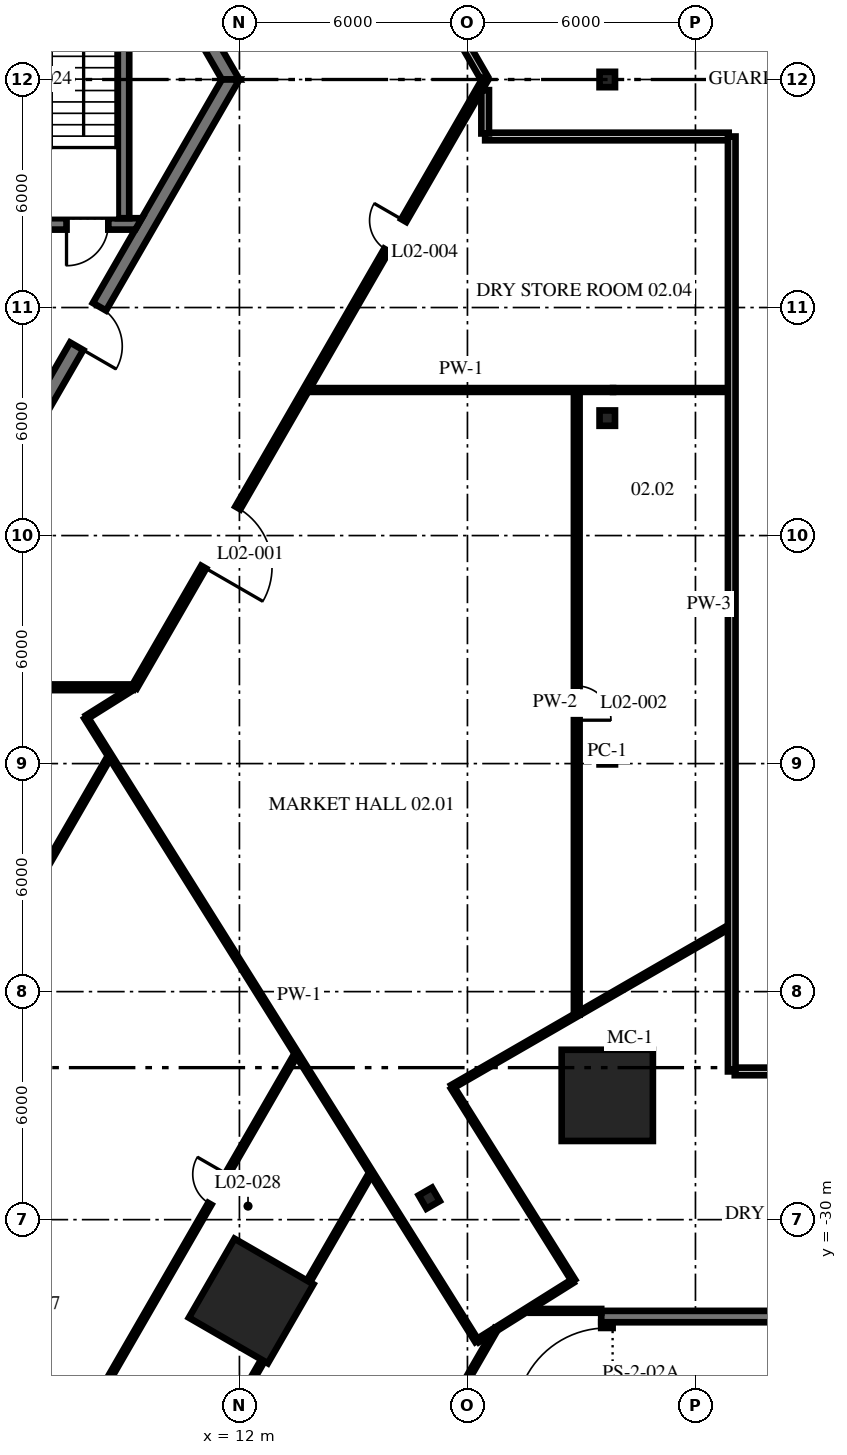
"""IFC4 building model, lengths in metres.
Left out: names, types, materials, properties, quantities, classifications, styles, units other than length and angle.
Written with IfcOpenShell. Run it as: python <this file> out.ifc"""

import sys

from ifc_helpers import new_model, si_unit, direction, frame, frame_2d, origin, origin_2d, place, context, subcontext, project, spatial, polyline, rectangle, i_section, outline, extrude, source, transform, mapped, element, fill, save


model = new_model("IFC4")
c1 = context("Model", 3, precision=1e-05, world=origin(), true_north=direction((0.0, 1.0)))
c2 = subcontext(c1, "Body", "Model", "MODEL_VIEW")
j1 = project(units=[si_unit("LENGTHUNIT", "METRE"), si_unit("PLANEANGLEUNIT", "RADIAN")], contexts=[c1])
p1 = place(None, origin())
s1 = spatial("IfcSite", under=j1, at=p1, CompositionType="ELEMENT")
p2 = place(p1, origin())
s2 = spatial("IfcBuilding", under=s1, at=p2, CompositionType="ELEMENT")
p3 = place(p2, frame((0.0, 0.0, 11.5)))
s3 = spatial("IfcBuildingStorey", under=s2, at=p3, CompositionType="ELEMENT", Elevation=11.5)
m1 = source(origin(), c2, "Body", "SweptSolid", [
    extrude(rectangle(XDim=2.4, YDim=2.4, at=origin_2d()), origin(), (0.0, 0.0, 1.0), 4.5),
])
p4 = place(p3, frame((21.679, -26.73, 0.0), z_axis=(0.0, 0.0, 1.0), x_axis=(0.0, 1.0, 0.0)))
e1 = element("IfcColumn", 1, at=p4, inside=s3, PredefinedType="COLUMN", context=c2, shape_type="MappedRepresentation", body=[
    mapped(m1, transform((0.0, 0.0, 0.0), scale=1.0)),
])
m2 = source(origin(), c2, "Body", "SweptSolid", [
    extrude(i_section(OverallWidth=0.404, OverallDepth=0.406, WebThickness=0.027, FlangeThickness=0.044, at=origin_2d()), origin(), (0.0, 0.0, 1.0), 4.5),
])
for number, where, z_axis, x_axis in (
    (2, (21.679, -17.82, 0.0), (0.0, 0.0, 1.0), (0.0, 1.0, 0.0)),
    (3, (21.679, -8.91, 0.0), (0.0, 0.0, 1.0), (0.0, 1.0, 0.0)),
    (4, (21.679, 0.0, 0.0), (0.0, 0.0, 1.0), (0.0, 1.0, 0.0)),
):
    element("IfcColumn", number, at=place(p3, frame(where, z_axis=z_axis, x_axis=x_axis)), inside=s3, PredefinedType="COLUMN", context=c2, shape_type="MappedRepresentation", body=[
        mapped(m2, transform((0.0, 0.0, 0.0), scale=1.0)),
    ])
p5 = place(p3, frame((12.309, -32.14, 0.0), z_axis=(0.0, 0.0, 1.0), x_axis=(0.866025403784, -0.5, 0.0)))
e5 = element("IfcColumn", 5, at=p5, inside=s3, PredefinedType="COLUMN", context=c2, shape_type="MappedRepresentation", body=[
    mapped(m1, transform((0.0, 0.0, 0.0), scale=1.0)),
])
p6 = place(p3, frame((16.994, -29.435, 0.0), z_axis=(0.0, 0.0, 1.0), x_axis=(0.866026276448, 0.4999984885, 0.0)))
e6 = element("IfcColumn", 6, at=p6, inside=s3, PredefinedType="COLUMN", context=c2, shape_type="MappedRepresentation", body=[
    mapped(m2, transform((0.0, 0.0, 0.0), scale=1.0)),
])
m3 = source(origin(), c2, "Body", "SweptSolid", [
    extrude(outline(polyline([(-0.115, -0.2), (11.885, -0.2), (11.654, 0.2), (0.115, 0.2), (-0.115, -0.2)])), origin(), (0.0, 0.0, 1.0), 4.3),
])
p7 = place(p3, frame((11.769, 0.0, 0.0), z_axis=(0.0, 0.0, 1.0), x_axis=(-0.499996592174, 0.866027371285, 0.0)))
e7 = element("IfcWall", 7, at=p7, inside=s3, PredefinedType="SHEAR", context=c2, shape_type="MappedRepresentation", body=[
    mapped(m3, transform((0.0, 0.0, 0.0), scale=1.0)),
])
p8 = place(p7, frame((5.75, 0.0, 0.0)))
e8 = element("IfcOpeningElement", 8, at=p8, cuts=e7, PredefinedType="OPENING", context=c2, shape_type="SweptSolid", body=[
    extrude(rectangle(XDim=1.2, YDim=2.1, at=frame_2d((0.6, 1.05))), frame((0.0, 0.21, 0.0), z_axis=(0.0, -1.0, 0.0), x_axis=(1.0, 0.0, 0.0)), (0.0, 0.0, 1.0), 0.42),
])
p9 = place(p3, frame((5.885, -10.192, 0.0), z_axis=(0.0, 0.0, 1.0), x_axis=(0.499996592174, 0.866027371285, 0.0)))
e9 = element("IfcWall", 9, at=p9, inside=s3, PredefinedType="SHEAR", context=c2, shape_type="MappedRepresentation", body=[
    mapped(m3, transform((0.0, 0.0, 0.0), scale=1.0)),
])
p10 = place(p9, frame((3.665, 0.0, 0.0)))
e10 = element("IfcOpeningElement", 10, at=p10, cuts=e9, PredefinedType="OPENING", context=c2, shape_type="SweptSolid", body=[
    extrude(rectangle(XDim=1.2, YDim=2.1, at=frame_2d((0.6, 1.05))), frame((0.0, 0.21, 0.0), z_axis=(0.0, -1.0, 0.0), x_axis=(1.0, 0.0, 0.0)), (0.0, 0.0, 1.0), 0.42),
])
m4 = source(origin(), c2, "Body", "SweptSolid", [
    extrude(outline(polyline([(0.0, -0.15), (0.0, 0.15), (4.433, 0.15), (4.26, -0.15), (0.0, -0.15)])), origin(), (0.0, 0.0, 1.0), 4.3),
])
p11 = place(p3, frame((5.0, -3.8, 0.0), z_axis=(0.0, 0.0, 1.0), x_axis=(1.0, 0.0, 0.0)))
e11 = element("IfcWall", 11, at=p11, inside=s3, PredefinedType="SHEAR", context=c2, shape_type="MappedRepresentation", body=[
    mapped(m4, transform((0.0, 0.0, 0.0), scale=1.0)),
])
p12 = place(p11, frame((2.45, 0.0, 0.0)))
e12 = element("IfcOpeningElement", 12, at=p12, cuts=e11, PredefinedType="OPENING", context=c2, shape_type="SweptSolid", body=[
    extrude(rectangle(XDim=1.1, YDim=2.1, at=frame_2d((0.55, 1.05))), frame((0.0, 0.16, 0.0), z_axis=(0.0, -1.0, 0.0), x_axis=(1.0, 0.0, 0.0)), (0.0, 0.0, 1.0), 0.32),
])
m5 = source(origin(), c2, "Body", "SweptSolid", [
    extrude(rectangle(XDim=7.3, YDim=0.3, at=frame_2d((3.65, 0.0))), origin(), (0.0, 0.0, 1.0), 4.3),
])
p13 = place(p3, frame((8.95, -3.65, 0.0), z_axis=(0.0, 0.0, 1.0), x_axis=(0.0, 1.0, 0.0)))
e13 = element("IfcWall", 13, at=p13, inside=s3, PredefinedType="SHEAR", context=c2, shape_type="MappedRepresentation", body=[
    mapped(m5, transform((0.0, 0.0, 0.0), scale=1.0)),
])
m6 = source(origin(), c2, "Body", "SweptSolid", [
    extrude(rectangle(XDim=10.3, YDim=0.3, at=frame_2d((5.15, 0.0))), origin(), (0.0, 0.0, 1.0), 4.3),
])
p14 = place(p3, frame((21.67, -43.0, 0.0), z_axis=(0.0, 0.0, 1.0), x_axis=(0.0, 1.0, 0.0)))
e14 = element("IfcWall", 14, at=p14, inside=s3, PredefinedType="SHEAR", context=c2, shape_type="MappedRepresentation", body=[
    mapped(m6, transform((0.0, 0.0, 0.0), scale=1.0)),
])
p15 = place(p14, frame((7.75, 0.0, 0.0)))
e15 = element("IfcOpeningElement", 15, at=p15, cuts=e14, PredefinedType="OPENING", context=c2, shape_type="SweptSolid", body=[
    extrude(rectangle(XDim=2.4, YDim=2.1, at=frame_2d((1.2, 1.05))), frame((0.0, 0.16, 0.0), z_axis=(0.0, -1.0, 0.0), x_axis=(1.0, 0.0, 0.0)), (0.0, 0.0, 1.0), 0.32),
])
m7 = source(origin(), c2, "Body", "SweptSolid", [
    extrude(rectangle(XDim=6.26, YDim=0.3, at=frame_2d((3.13, 0.0))), origin(), (0.0, 0.0, 1.0), 4.3),
])
p16 = place(p3, frame((21.52, -32.55, 0.0), z_axis=(0.0, 0.0, 1.0), x_axis=(1.0, 0.0, 0.0)))
e16 = element("IfcWall", 16, at=p16, inside=s3, PredefinedType="SHEAR", context=c2, shape_type="MappedRepresentation", body=[
    mapped(m7, transform((0.0, 0.0, 0.0), scale=1.0)),
])
p17 = place(p3, frame((9.254, 15.956, 0.0), z_axis=(0.0, 0.0, 1.0), x_axis=(0.499997220877, -0.866027008306, 0.0)))
e17 = element("IfcWall", 17, at=p17, inside=s3, PredefinedType="PARTITIONING", context=c2, shape_type="SweptSolid", body=[
    extrude(rectangle(XDim=18.382, YDim=0.2, at=frame_2d((9.191, 0.0))), origin(), (0.0, 0.0, 1.0), 4.3),
])
p18 = place(p17, frame((13.274, 0.0, 0.0)))
e18 = element("IfcOpeningElement", 18, at=p18, cuts=e17, PredefinedType="OPENING", context=c2, shape_type="SweptSolid", body=[
    extrude(rectangle(XDim=0.9, YDim=2.1, at=frame_2d((0.45, 1.05))), frame((0.0, 0.11, 0.0), z_axis=(0.0, -1.0, 0.0), x_axis=(1.0, 0.0, 0.0)), (0.0, 0.0, 1.0), 0.22),
])
p19 = place(p3, frame((7.962, -16.789, 0.0), z_axis=(0.0, 0.0, 1.0), x_axis=(0.531179225495, -0.847259482333, 0.0)))
e19 = element("IfcWall", 19, at=p19, inside=s3, PredefinedType="PARTITIONING", context=c2, shape_type="SweptSolid", body=[
    extrude(rectangle(XDim=19.366, YDim=0.1, at=frame_2d((9.683, 0.0))), origin(), (0.0, 0.0, 1.0), 4.3),
])
p20 = place(p3, frame((17.61, -26.529, 0.0), z_axis=(0.0, 0.0, 1.0), x_axis=(0.531181923243, -0.847257791006, 0.0)))
e20 = element("IfcWall", 20, at=p20, inside=s3, PredefinedType="PARTITIONING", context=c2, shape_type="SweptSolid", body=[
    extrude(rectangle(XDim=5.989, YDim=0.1, at=frame_2d((2.995, 0.0))), origin(), (0.0, 0.0, 1.0), 4.3),
])
p21 = place(p3, frame((19.66, -32.4, 0.0), z_axis=(0.0, 0.0, 1.0), x_axis=(1.0, 0.0, 0.0)))
e21 = element("IfcWall", 21, at=p21, inside=s3, PredefinedType="PARTITIONING", context=c2, shape_type="SweptSolid", body=[
    extrude(rectangle(XDim=1.86, YDim=0.1, at=frame_2d((0.93, 0.0))), origin(), (0.0, 0.0, 1.0), 4.3),
])
p22 = place(p3, frame((25.034, -26.1, 0.0), z_axis=(0.0, 0.0, 1.0), x_axis=(1.0, 0.0, 0.0)))
e22 = element("IfcWall", 22, at=p22, inside=s3, PredefinedType="PARTITIONING", context=c2, shape_type="SweptSolid", body=[
    extrude(rectangle(XDim=6.345, YDim=0.2, at=frame_2d((3.173, 0.0))), origin(), (0.0, 0.0, 1.0), 4.3),
])
p23 = place(p22, frame((2.67, 0.0, 0.0)))
e23 = element("IfcOpeningElement", 23, at=p23, cuts=e22, PredefinedType="OPENING", context=c2, shape_type="SweptSolid", body=[
    extrude(rectangle(XDim=0.9, YDim=2.1, at=frame_2d((0.45, 1.05))), frame((0.0, 0.11, 0.0), z_axis=(0.0, -1.0, 0.0), x_axis=(1.0, 0.0, 0.0)), (0.0, 0.0, 1.0), 0.22),
])
p24 = place(p3, frame((-9.193, -15.992, 0.0), z_axis=(0.0, 0.0, 1.0), x_axis=(1.0, 0.0, 0.0)))
e24 = element("IfcWall", 24, at=p24, inside=s3, PredefinedType="PARTITIONING", context=c2, shape_type="SweptSolid", body=[
    extrude(rectangle(XDim=18.385, YDim=0.15, at=frame_2d((9.192, 0.0))), origin(), (0.0, 0.0, 1.0), 4.3),
])
p25 = place(p24, frame((4.21, 0.0, 0.0)))
e25 = element("IfcOpeningElement", 25, at=p25, cuts=e24, PredefinedType="OPENING", context=c2, shape_type="SweptSolid", body=[
    extrude(rectangle(XDim=0.9, YDim=2.1, at=frame_2d((0.45, 1.05))), frame((0.0, 0.085, 0.0), z_axis=(0.0, -1.0, 0.0), x_axis=(1.0, 0.0, 0.0)), (0.0, 0.0, 1.0), 0.17),
])
p26 = place(p24, frame((13.444, 0.0, 0.0)))
e26 = element("IfcOpeningElement", 26, at=p26, cuts=e24, PredefinedType="OPENING", context=c2, shape_type="SweptSolid", body=[
    extrude(rectangle(XDim=0.9, YDim=2.1, at=frame_2d((0.45, 1.05))), frame((0.0, 0.085, 0.0), z_axis=(0.0, -1.0, 0.0), x_axis=(1.0, 0.0, 0.0)), (0.0, 0.0, 1.0), 0.17),
])
m8 = source(origin(), c2, "Body", "SweptSolid", [
    extrude(rectangle(XDim=7.992, YDim=0.1, at=frame_2d((3.996, 0.0))), origin(), (0.0, 0.0, 1.0), 4.3),
])
p27 = place(p3, frame((13.839, -8.17, 0.0), z_axis=(0.0, 0.0, 1.0), x_axis=(1.0, 0.0, 0.0)))
e27 = element("IfcWall", 27, at=p27, inside=s3, PredefinedType="PARTITIONING", context=c2, shape_type="MappedRepresentation", body=[
    mapped(m8, transform((0.0, 0.0, 0.0), scale=1.0)),
])
p28 = place(p3, frame((21.832, -8.17, 0.0), z_axis=(0.0, 0.0, 1.0), x_axis=(1.0, 0.0, 0.0)))
e28 = element("IfcWall", 28, at=p28, inside=s3, PredefinedType="PARTITIONING", context=c2, shape_type="SweptSolid", body=[
    extrude(rectangle(XDim=3.042, YDim=0.1, at=frame_2d((1.521, 0.0))), origin(), (0.0, 0.0, 1.0), 3.528),
])
p29 = place(p3, frame((18.466, -1.5, 0.0), z_axis=(0.0, 0.0, 1.0), x_axis=(1.0, 0.0, 0.0)))
e29 = element("IfcWall", 29, at=p29, inside=s3, PredefinedType="PARTITIONING", context=c2, shape_type="SweptSolid", body=[
    extrude(rectangle(XDim=6.408, YDim=0.2, at=frame_2d((3.204, 0.0))), origin(), (0.0, 0.0, 1.0), 4.3),
])
p30 = place(p3, frame((17.594, -26.503, 0.0), z_axis=(0.0, 0.0, 1.0), x_axis=(0.86602013072, 0.500009133105, 0.0)))
e30 = element("IfcWall", 30, at=p30, inside=s3, PredefinedType="PARTITIONING", context=c2, shape_type="SweptSolid", body=[
    extrude(rectangle(XDim=8.379, YDim=0.1, at=frame_2d((4.189, 0.0))), origin(), (0.0, 0.0, 1.0), 4.3),
])
p31 = place(p3, frame((18.272, -33.182, 0.0), z_axis=(0.0, 0.0, 1.0), x_axis=(0.847486689637, 0.530816645263, 0.0)))
e31 = element("IfcWall", 31, at=p31, inside=s3, PredefinedType="PARTITIONING", context=c2, shape_type="SweptSolid", body=[
    extrude(rectangle(XDim=0.402, YDim=0.1, at=frame_2d((0.201, 0.0))), origin(), (0.0, 0.0, 1.0), 4.3),
])
p32 = place(p3, frame((18.751, -32.882, 0.0), z_axis=(0.0, 0.0, 1.0), x_axis=(0.847201589507, 0.531271556492, 0.0)))
e32 = element("IfcWall", 32, at=p32, inside=s3, PredefinedType="PARTITIONING", context=c2, shape_type="SweptSolid", body=[
    extrude(rectangle(XDim=2.379, YDim=0.1, at=frame_2d((1.189, 0.0))), origin(), (0.0, 0.0, 1.0), 4.3),
])
p33 = place(p3, frame((7.988, -16.773, 0.0), z_axis=(0.0, 0.0, 1.0), x_axis=(0.84724259676, 0.531206157942, 0.0)))
e33 = element("IfcWall", 33, at=p33, inside=s3, PredefinedType="PARTITIONING", context=c2, shape_type="SweptSolid", body=[
    extrude(rectangle(XDim=1.29, YDim=0.1, at=frame_2d((0.645, 0.0))), origin(), (0.0, 0.0, 1.0), 4.3),
])
p34 = place(p3, frame((12.612, -43.515, 0.0), z_axis=(0.0, 0.0, 1.0), x_axis=(0.500009898248, 0.866019688953, 0.0)))
e34 = element("IfcWall", 34, at=p34, inside=s3, PredefinedType="PARTITIONING", context=c2, shape_type="SweptSolid", body=[
    extrude(rectangle(XDim=12.278, YDim=0.1, at=frame_2d((6.139, 0.0))), origin(), (0.0, 0.0, 1.0), 4.3),
])
p35 = place(p34, frame((5.675, 0.0, 0.0)))
e35 = element("IfcOpeningElement", 35, at=p35, cuts=e34, PredefinedType="OPENING", context=c2, shape_type="SweptSolid", body=[
    extrude(rectangle(XDim=0.9, YDim=2.1, at=frame_2d((0.45, 1.05))), frame((0.0, 0.06, 0.0), z_axis=(0.0, -1.0, 0.0), x_axis=(1.0, 0.0, 0.0)), (0.0, 0.0, 1.0), 0.12),
])
p36 = place(p3, frame((8.367, -41.064, 0.0), z_axis=(0.0, 0.0, 1.0), x_axis=(0.500002254446, 0.866024102175, 0.0)))
e36 = element("IfcWall", 36, at=p36, inside=s3, PredefinedType="PARTITIONING", context=c2, shape_type="SweptSolid", body=[
    extrude(rectangle(XDim=8.51, YDim=0.1, at=frame_2d((4.255, 0.0))), origin(), (0.0, 0.0, 1.0), 4.3),
])
p37 = place(p36, frame((6.575, 0.0, 0.0)))
e37 = element("IfcOpeningElement", 37, at=p37, cuts=e36, PredefinedType="OPENING", context=c2, shape_type="SweptSolid", body=[
    extrude(rectangle(XDim=0.9, YDim=2.1, at=frame_2d((0.45, 1.05))), frame((0.0, 0.06, 0.0), z_axis=(0.0, -1.0, 0.0), x_axis=(1.0, 0.0, 0.0)), (0.0, 0.0, 1.0), 0.12),
])
p38 = place(p3, frame((13.812, -31.633, 0.0), z_axis=(0.0, 0.0, 1.0), x_axis=(0.500027630784, 0.866009450556, 0.0)))
e38 = element("IfcWall", 38, at=p38, inside=s3, PredefinedType="PARTITIONING", context=c2, shape_type="SweptSolid", body=[
    extrude(rectangle(XDim=3.255, YDim=0.1, at=frame_2d((1.627, 0.0))), origin(), (0.0, 0.0, 1.0), 4.3),
])
p39 = place(p3, frame((6.064, -38.517, 0.0), z_axis=(0.0, 0.0, 1.0), x_axis=(0.49999573669, 0.866027865194, 0.0)))
e39 = element("IfcWall", 39, at=p39, inside=s3, PredefinedType="PARTITIONING", context=c2, shape_type="SweptSolid", body=[
    extrude(rectangle(XDim=14.822, YDim=0.1, at=frame_2d((7.411, 0.0))), origin(), (0.0, 0.0, 1.0), 4.3),
])
p40 = place(p39, frame((10.315, 0.0, 0.0)))
e40 = element("IfcOpeningElement", 40, at=p40, cuts=e39, PredefinedType="OPENING", context=c2, shape_type="SweptSolid", body=[
    extrude(rectangle(XDim=0.9, YDim=2.1, at=frame_2d((0.45, 1.05))), frame((0.0, 0.06, 0.0), z_axis=(0.0, -1.0, 0.0), x_axis=(1.0, 0.0, 0.0)), (0.0, 0.0, 1.0), 0.12),
])
p41 = place(p3, frame((-1.012, -34.432, 0.0), z_axis=(0.0, 0.0, 1.0), x_axis=(0.500000180364, 0.866025299651, 0.0)))
e41 = element("IfcWall", 41, at=p41, inside=s3, PredefinedType="PARTITIONING", context=c2, shape_type="SweptSolid", body=[
    extrude(rectangle(XDim=19.15, YDim=0.1, at=frame_2d((9.575, 0.0))), origin(), (0.0, 0.0, 1.0), 4.3),
])
p42 = place(p41, frame((9.121, 0.0, 0.0)))
e42 = element("IfcOpeningElement", 42, at=p42, cuts=e41, PredefinedType="OPENING", context=c2, shape_type="SweptSolid", body=[
    extrude(rectangle(XDim=0.9, YDim=2.1, at=frame_2d((0.45, 1.05))), frame((0.0, 0.06, 0.0), z_axis=(0.0, -1.0, 0.0), x_axis=(1.0, 0.0, 0.0)), (0.0, 0.0, 1.0), 0.12),
])
p43 = place(p3, frame((9.234, -15.991, 0.0), z_axis=(0.0, 0.0, 1.0), x_axis=(0.499997555488, 0.866026815119, 0.0)))
e43 = element("IfcWall", 43, at=p43, inside=s3, PredefinedType="PARTITIONING", context=c2, shape_type="SweptSolid", body=[
    extrude(rectangle(XDim=18.462, YDim=0.15, at=frame_2d((9.231, 0.0))), origin(), (0.0, 0.0, 1.0), 4.3),
])
p44 = place(p43, frame((3.648, 0.0, 0.0)))
e44 = element("IfcOpeningElement", 44, at=p44, cuts=e43, PredefinedType="OPENING", context=c2, shape_type="SweptSolid", body=[
    extrude(rectangle(XDim=1.8, YDim=2.4, at=frame_2d((0.9, 1.2))), frame((0.0, 0.085, 0.0), z_axis=(0.0, -1.0, 0.0), x_axis=(1.0, 0.0, 0.0)), (0.0, 0.0, 1.0), 0.17),
])
p45 = place(p43, frame((13.281, 0.0, 0.0)))
e45 = element("IfcOpeningElement", 45, at=p45, cuts=e43, PredefinedType="OPENING", context=c2, shape_type="SweptSolid", body=[
    extrude(rectangle(XDim=0.9, YDim=2.1, at=frame_2d((0.45, 1.05))), frame((0.0, 0.085, 0.0), z_axis=(0.0, -1.0, 0.0), x_axis=(1.0, 0.0, 0.0)), (0.0, 0.0, 1.0), 0.17),
])
p46 = place(p3, frame((24.954, -26.1, 0.0), z_axis=(0.0, 0.0, 1.0), x_axis=(0.0, 1.0, 0.0)))
e46 = element("IfcWall", 46, at=p46, inside=s3, PredefinedType="PARTITIONING", context=c2, shape_type="SweptSolid", body=[
    extrude(rectangle(XDim=24.6, YDim=0.2, at=frame_2d((12.3, 0.0))), origin(), (0.0, 0.0, 1.0), 4.3),
])
p47 = place(p3, frame((20.876, -24.608, 0.0), z_axis=(0.0, 0.0, 1.0), x_axis=(0.0, 1.0, 0.0)))
e47 = element("IfcWall", 47, at=p47, inside=s3, PredefinedType="PARTITIONING", context=c2, shape_type="SweptSolid", body=[
    extrude(rectangle(XDim=16.438, YDim=0.15, at=frame_2d((8.219, 0.0))), origin(), (0.0, 0.0, 1.0), 4.3),
])
p48 = place(p47, frame((7.75, 0.0, 0.0)))
e48 = element("IfcOpeningElement", 48, at=p48, cuts=e47, PredefinedType="OPENING", context=c2, shape_type="SweptSolid", body=[
    extrude(rectangle(XDim=0.9, YDim=2.1, at=frame_2d((0.45, 1.05))), frame((0.0, 0.085, 0.0), z_axis=(0.0, -1.0, 0.0), x_axis=(1.0, 0.0, 0.0)), (0.0, 0.0, 1.0), 0.17),
])
p49 = place(p3, frame((18.466, -1.42, 0.0), z_axis=(0.0, 0.0, 1.0), x_axis=(0.0, 1.0, 0.0)))
e49 = element("IfcWall", 49, at=p49, inside=s3, PredefinedType="PARTITIONING", context=c2, shape_type="SweptSolid", body=[
    extrude(rectangle(XDim=1.14, YDim=0.2, at=frame_2d((0.57, 0.0))), origin(), (0.0, 0.0, 1.0), 4.3),
])
p50 = place(p10, frame((1.2, 0.0, 0.0), z_axis=(0.0, 0.0, 1.0), x_axis=(-1.0, 0.0, 0.0)))
e50 = element("IfcDoor", 50, at=p50, inside=s3, OperationType="SINGLE_SWING_RIGHT", PredefinedType="DOOR", context=c2, shape_type="SweptSolid", body=[
    extrude(rectangle(XDim=1.2, YDim=2.1, at=frame_2d((0.6, 1.05))), frame((0.0, 0.025, 0.0), z_axis=(0.0, -1.0, 0.0), x_axis=(1.0, 0.0, 0.0)), (0.0, 0.0, 1.0), 0.05),
])
fill(e10, e50)
p51 = place(p12, frame((1.1, 0.0, 0.0), z_axis=(0.0, 0.0, 1.0), x_axis=(-1.0, 0.0, 0.0)))
e51 = element("IfcDoor", 51, at=p51, inside=s3, OperationType="SINGLE_SWING_RIGHT", PredefinedType="DOOR", context=c2, shape_type="SweptSolid", body=[
    extrude(rectangle(XDim=1.1, YDim=2.1, at=frame_2d((0.55, 1.05))), frame((0.0, 0.025, 0.0), z_axis=(0.0, -1.0, 0.0), x_axis=(1.0, 0.0, 0.0)), (0.0, 0.0, 1.0), 0.05),
])
fill(e12, e51)
p52 = place(p15, origin())
e52 = element("IfcDoor", 52, at=p52, inside=s3, OperationType="DOUBLE_DOOR_DOUBLE_SWING", PredefinedType="DOOR", context=c2, shape_type="SweptSolid", body=[
    extrude(rectangle(XDim=2.4, YDim=2.1, at=frame_2d((1.2, 1.05))), frame((0.0, 0.025, 0.0), z_axis=(0.0, -1.0, 0.0), x_axis=(1.0, 0.0, 0.0)), (0.0, 0.0, 1.0), 0.05),
])
fill(e15, e52)
p53 = place(p44, origin())
e53 = element("IfcDoor", 53, at=p53, inside=s3, OperationType="DOUBLE_DOOR_SINGLE_SWING", PredefinedType="DOOR", context=c2, shape_type="SweptSolid", body=[
    extrude(rectangle(XDim=1.8, YDim=2.4, at=frame_2d((0.9, 1.2))), frame((0.0, 0.025, 0.0), z_axis=(0.0, -1.0, 0.0), x_axis=(1.0, 0.0, 0.0)), (0.0, 0.0, 1.0), 0.05),
])
fill(e44, e53)
p54 = place(p48, origin())
e54 = element("IfcDoor", 54, at=p54, inside=s3, OperationType="SINGLE_SWING_RIGHT", PredefinedType="DOOR", context=c2, shape_type="SweptSolid", body=[
    extrude(rectangle(XDim=0.9, YDim=2.1, at=frame_2d((0.45, 1.05))), frame((0.0, 0.025, 0.0), z_axis=(0.0, -1.0, 0.0), x_axis=(1.0, 0.0, 0.0)), (0.0, 0.0, 1.0), 0.05),
])
fill(e48, e54)
p55 = place(p45, origin())
e55 = element("IfcDoor", 55, at=p55, inside=s3, OperationType="SINGLE_SWING_LEFT", PredefinedType="DOOR", context=c2, shape_type="SweptSolid", body=[
    extrude(rectangle(XDim=0.9, YDim=2.1, at=frame_2d((0.45, 1.05))), frame((0.0, 0.025, 0.0), z_axis=(0.0, -1.0, 0.0), x_axis=(1.0, 0.0, 0.0)), (0.0, 0.0, 1.0), 0.05),
])
fill(e45, e55)
p56 = place(p40, origin())
e56 = element("IfcDoor", 56, at=p56, inside=s3, OperationType="SINGLE_SWING_LEFT", PredefinedType="DOOR", context=c2, shape_type="SweptSolid", body=[
    extrude(rectangle(XDim=0.9, YDim=2.1, at=frame_2d((0.45, 1.05))), frame((0.0, 0.025, 0.0), z_axis=(0.0, -1.0, 0.0), x_axis=(1.0, 0.0, 0.0)), (0.0, 0.0, 1.0), 0.05),
])
fill(e40, e56)
save(model, sys.argv[1])
